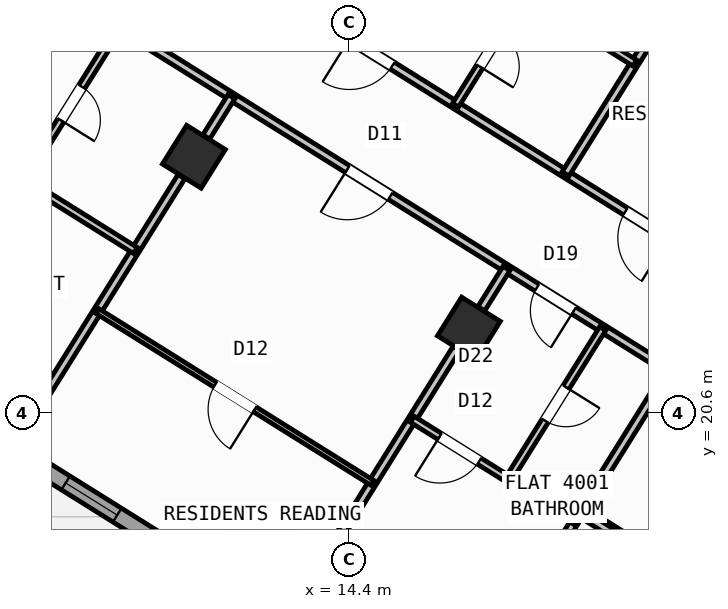
"""IFC4 building model, lengths in metres.
Left out: names, types, materials, properties, quantities, classifications, styles, units other than length and angle.
Written with IfcOpenShell. Run it as: python <this file> out.ifc"""

import sys

from ifc_helpers import new_model, si_unit, direction, frame, frame_2d, origin, origin_2d, place, context, subcontext, project, spatial, rectangle, hollow_rectangle, extrude, source, transform, mapped, element, fill, save


model = new_model("IFC4")
c1 = context("Model", 3, precision=1e-05, world=origin(), true_north=direction((0.0, 1.0)))
c2 = subcontext(c1, "Body", "Model", "MODEL_VIEW")
j1 = project(units=[si_unit("LENGTHUNIT", "METRE"), si_unit("PLANEANGLEUNIT", "RADIAN")], contexts=[c1])
p1 = place(None, origin())
s1 = spatial("IfcSite", under=j1, at=p1, CompositionType="ELEMENT")
p2 = place(p1, origin())
s2 = spatial("IfcBuilding", under=s1, at=p2, CompositionType="ELEMENT")
p3 = place(p2, frame((0.0, 0.0, 158.7)))
s3 = spatial("IfcBuildingStorey", under=s2, at=p3, CompositionType="ELEMENT", Elevation=158.7)
m1 = source(origin(), c2, "Body", "SweptSolid", [
    extrude(hollow_rectangle(XDim=0.9, YDim=0.9, WallThickness=0.036, at=origin_2d()), origin(), (0.0, 0.0, 1.0), 3.6),
])
for number, where, z_axis, x_axis in (
    (1, (16.764, 22.261, 0.0), (0.0, 0.0, 1.0), (-0.848, 0.53, 0.0)),
    (2, (11.336, 25.653, 0.0), (0.0, 0.0, 1.0), (-0.848, 0.53, 0.0)),
):
    element("IfcColumn", number, at=place(p3, frame(where, z_axis=z_axis, x_axis=x_axis)), inside=s3, PredefinedType="COLUMN", context=c2, shape_type="MappedRepresentation", body=[
        mapped(m1, transform((0.0, 0.0, 0.0), scale=1.0)),
    ])
p4 = place(p3, frame((29.268, 6.429, 0.0), z_axis=(0.0, 0.0, 1.0), x_axis=(-0.848049971435, 0.529916263149, 0.0)))
e3 = element("IfcWall", 3, at=p4, inside=s3, PredefinedType="STANDARD", context=c2, shape_type="SweptSolid", body=[
    extrude(rectangle(XDim=31.588, YDim=0.32, at=frame_2d((15.794, 0.0))), origin(), (0.0, 0.0, 1.0), 3.35),
])
p5 = place(p4, frame((16.362, 0.0, 0.0)))
e4 = element("IfcOpeningElement", 4, at=p5, cuts=e3, PredefinedType="OPENING", context=c2, shape_type="SweptSolid", body=[
    extrude(rectangle(XDim=1.2, YDim=2.15, at=frame_2d((0.6, 1.075))), frame((0.0, 0.17, 0.0), z_axis=(0.0, -1.0, 0.0), x_axis=(1.0, 0.0, 0.0)), (0.0, 0.0, 1.0), 0.34),
])
p6 = place(p4, frame((2.989, 0.0, 0.8)))
e5 = element("IfcOpeningElement", 5, at=p6, cuts=e3, PredefinedType="OPENING", context=c2, shape_type="SweptSolid", body=[
    extrude(rectangle(XDim=2.1, YDim=1.55, at=frame_2d((1.05, 0.775))), frame((0.0, 0.17, 0.0), z_axis=(0.0, -1.0, 0.0), x_axis=(1.0, 0.0, 0.0)), (0.0, 0.0, 1.0), 0.34),
])
p7 = place(p4, frame((8.359, 0.0, 0.8)))
e6 = element("IfcOpeningElement", 6, at=p7, cuts=e3, PredefinedType="OPENING", context=c2, shape_type="SweptSolid", body=[
    extrude(rectangle(XDim=2.1, YDim=1.55, at=frame_2d((1.05, 0.775))), frame((0.0, 0.17, 0.0), z_axis=(0.0, -1.0, 0.0), x_axis=(1.0, 0.0, 0.0)), (0.0, 0.0, 1.0), 0.34),
])
p8 = place(p4, frame((13.284, 0.0, 0.95)))
e7 = element("IfcOpeningElement", 7, at=p8, cuts=e3, PredefinedType="OPENING", context=c2, shape_type="SweptSolid", body=[
    extrude(rectangle(XDim=1.2, YDim=1.4, at=frame_2d((0.6, 0.7))), frame((0.0, 0.17, 0.0), z_axis=(0.0, -1.0, 0.0), x_axis=(1.0, 0.0, 0.0)), (0.0, 0.0, 1.0), 0.34),
])
p9 = place(p4, frame((20.259, 0.0, 0.95)))
e8 = element("IfcOpeningElement", 8, at=p9, cuts=e3, PredefinedType="OPENING", context=c2, shape_type="SweptSolid", body=[
    extrude(rectangle(XDim=1.2, YDim=1.4, at=frame_2d((0.6, 0.7))), frame((0.0, 0.17, 0.0), z_axis=(0.0, -1.0, 0.0), x_axis=(1.0, 0.0, 0.0)), (0.0, 0.0, 1.0), 0.34),
])
p10 = place(p4, frame((22.929, 0.0, 0.95)))
e9 = element("IfcOpeningElement", 9, at=p10, cuts=e3, PredefinedType="OPENING", context=c2, shape_type="SweptSolid", body=[
    extrude(rectangle(XDim=1.2, YDim=1.4, at=frame_2d((0.6, 0.7))), frame((0.0, 0.17, 0.0), z_axis=(0.0, -1.0, 0.0), x_axis=(1.0, 0.0, 0.0)), (0.0, 0.0, 1.0), 0.34),
])
p11 = place(p4, frame((27.481, 0.0, 0.8)))
e10 = element("IfcOpeningElement", 10, at=p11, cuts=e3, PredefinedType="OPENING", context=c2, shape_type="SweptSolid", body=[
    extrude(rectangle(XDim=2.1, YDim=1.55, at=frame_2d((1.05, 0.775))), frame((0.0, 0.17, 0.0), z_axis=(0.0, -1.0, 0.0), x_axis=(1.0, 0.0, 0.0)), (0.0, 0.0, 1.0), 0.34),
])
p12 = place(p3, frame((2.415, 23.452, 0.0), z_axis=(0.0, 0.0, 1.0), x_axis=(0.52991049553, 0.848053575387, 0.0)))
e11 = element("IfcWall", 11, at=p12, inside=s3, PredefinedType="STANDARD", context=c2, shape_type="SweptSolid", body=[
    extrude(rectangle(XDim=21.587, YDim=0.32, at=frame_2d((10.794, 0.0))), origin(), (0.0, 0.0, 1.0), 2.775),
])
p13 = place(p12, frame((1.406, 0.0, 0.8)))
e12 = element("IfcOpeningElement", 12, at=p13, cuts=e11, PredefinedType="OPENING", context=c2, shape_type="SweptSolid", body=[
    extrude(rectangle(XDim=2.1, YDim=1.55, at=frame_2d((1.05, 0.775))), frame((0.0, 0.17, 0.0), z_axis=(0.0, -1.0, 0.0), x_axis=(1.0, 0.0, 0.0)), (0.0, 0.0, 1.0), 0.34),
])
p14 = place(p12, frame((10.949, 0.0, 1.0)))
e13 = element("IfcOpeningElement", 13, at=p14, cuts=e11, PredefinedType="OPENING", context=c2, shape_type="SweptSolid", body=[
    extrude(rectangle(XDim=0.9, YDim=1.25, at=frame_2d((0.45, 0.625))), frame((0.0, 0.17, 0.0), z_axis=(0.0, -1.0, 0.0), x_axis=(1.0, 0.0, 0.0)), (0.0, 0.0, 1.0), 0.34),
])
p15 = place(p12, frame((15.369, 0.0, 0.85)))
e14 = element("IfcOpeningElement", 14, at=p15, cuts=e11, PredefinedType="OPENING", context=c2, shape_type="SweptSolid", body=[
    extrude(rectangle(XDim=1.5, YDim=1.5, at=frame_2d((0.75, 0.75))), frame((0.0, 0.17, 0.0), z_axis=(0.0, -1.0, 0.0), x_axis=(1.0, 0.0, 0.0)), (0.0, 0.0, 1.0), 0.34),
])
p16 = place(p12, frame((18.219, 0.0, 0.85)))
e15 = element("IfcOpeningElement", 15, at=p16, cuts=e11, PredefinedType="OPENING", context=c2, shape_type="SweptSolid", body=[
    extrude(rectangle(XDim=1.5, YDim=1.5, at=frame_2d((0.75, 0.75))), frame((0.0, 0.17, 0.0), z_axis=(0.0, -1.0, 0.0), x_axis=(1.0, 0.0, 0.0)), (0.0, 0.0, 1.0), 0.34),
])
p17 = place(p3, frame((14.138, 41.825, 0.0), z_axis=(0.0, 0.0, 1.0), x_axis=(0.848046498049, -0.529921821731, 0.0)))
e16 = element("IfcWall", 16, at=p17, inside=s3, PredefinedType="STANDARD", context=c2, shape_type="SweptSolid", body=[
    extrude(rectangle(XDim=31.588, YDim=0.32, at=frame_2d((15.794, 0.0))), origin(), (0.0, 0.0, 1.0), 3.35),
])
p18 = place(p17, frame((9.792, 0.0, 0.0)))
e17 = element("IfcOpeningElement", 17, at=p18, cuts=e16, PredefinedType="OPENING", context=c2, shape_type="SweptSolid", body=[
    extrude(rectangle(XDim=1.05, YDim=2.15, at=frame_2d((0.525, 1.075))), frame((0.0, 0.17, 0.0), z_axis=(0.0, -1.0, 0.0), x_axis=(1.0, 0.0, 0.0)), (0.0, 0.0, 1.0), 0.34),
])
p19 = place(p17, frame((0.791, 0.0, 0.85)))
e18 = element("IfcOpeningElement", 18, at=p19, cuts=e16, PredefinedType="OPENING", context=c2, shape_type="SweptSolid", body=[
    extrude(rectangle(XDim=1.8, YDim=1.5, at=frame_2d((0.9, 0.75))), frame((0.0, 0.17, 0.0), z_axis=(0.0, -1.0, 0.0), x_axis=(1.0, 0.0, 0.0)), (0.0, 0.0, 1.0), 0.34),
])
p20 = place(p17, frame((3.996, 0.0, 0.95)))
e19 = element("IfcOpeningElement", 19, at=p20, cuts=e16, PredefinedType="OPENING", context=c2, shape_type="SweptSolid", body=[
    extrude(rectangle(XDim=1.2, YDim=1.4, at=frame_2d((0.6, 0.7))), frame((0.0, 0.17, 0.0), z_axis=(0.0, -1.0, 0.0), x_axis=(1.0, 0.0, 0.0)), (0.0, 0.0, 1.0), 0.34),
])
p21 = place(p17, frame((13.874, 0.0, 0.85)))
e20 = element("IfcOpeningElement", 20, at=p21, cuts=e16, PredefinedType="OPENING", context=c2, shape_type="SweptSolid", body=[
    extrude(rectangle(XDim=1.5, YDim=1.5, at=frame_2d((0.75, 0.75))), frame((0.0, 0.17, 0.0), z_axis=(0.0, -1.0, 0.0), x_axis=(1.0, 0.0, 0.0)), (0.0, 0.0, 1.0), 0.34),
])
p22 = place(p17, frame((17.104, 0.0, 1.0)))
e21 = element("IfcOpeningElement", 21, at=p22, cuts=e16, PredefinedType="OPENING", context=c2, shape_type="SweptSolid", body=[
    extrude(rectangle(XDim=0.9, YDim=1.25, at=frame_2d((0.45, 0.625))), frame((0.0, 0.17, 0.0), z_axis=(0.0, -1.0, 0.0), x_axis=(1.0, 0.0, 0.0)), (0.0, 0.0, 1.0), 0.34),
])
p23 = place(p17, frame((22.144, 0.0, 1.0)))
e22 = element("IfcOpeningElement", 22, at=p23, cuts=e16, PredefinedType="OPENING", context=c2, shape_type="SweptSolid", body=[
    extrude(rectangle(XDim=0.9, YDim=1.25, at=frame_2d((0.45, 0.625))), frame((0.0, 0.17, 0.0), z_axis=(0.0, -1.0, 0.0), x_axis=(1.0, 0.0, 0.0)), (0.0, 0.0, 1.0), 0.34),
])
p24 = place(p17, frame((27.744, 0.0, 1.0)))
e23 = element("IfcOpeningElement", 23, at=p24, cuts=e16, PredefinedType="OPENING", context=c2, shape_type="SweptSolid", body=[
    extrude(rectangle(XDim=0.9, YDim=1.25, at=frame_2d((0.45, 0.625))), frame((0.0, 0.17, 0.0), z_axis=(0.0, -1.0, 0.0), x_axis=(1.0, 0.0, 0.0)), (0.0, 0.0, 1.0), 0.34),
])
p25 = place(p3, frame((21.206, 17.292, 0.0), z_axis=(0.0, 0.0, 1.0), x_axis=(-0.848050851465, 0.529914854792, 0.0)))
e24 = element("IfcWall", 24, at=p25, inside=s3, PredefinedType="PARTITIONING", context=c2, shape_type="SweptSolid", body=[
    extrude(rectangle(XDim=2.61, YDim=0.16, at=frame_2d((1.305, 0.0))), origin(), (0.0, 0.0, 1.0), 3.34),
])
p26 = place(p3, frame((20.719, 21.44, 0.0), z_axis=(0.0, 0.0, 1.0), x_axis=(-0.529906246318, -0.848056230514, 0.0)))
e25 = element("IfcWall", 25, at=p26, inside=s3, PredefinedType="PARTITIONING", context=c2, shape_type="SweptSolid", body=[
    extrude(rectangle(XDim=8.05, YDim=0.16, at=frame_2d((4.025, 0.0))), origin(), (0.0, 0.0, 1.0), 3.34),
])
p27 = place(p3, frame((21.885, 23.306, 0.0), z_axis=(0.0, 0.0, 1.0), x_axis=(-0.848052408131, 0.529912363569, 0.0)))
e26 = element("IfcWall", 26, at=p27, inside=s3, PredefinedType="PARTITIONING", context=c2, shape_type="SweptSolid", body=[
    extrude(rectangle(XDim=16.73, YDim=0.16, at=frame_2d((8.365, 0.0))), origin(), (0.0, 0.0, 1.0), 3.34),
])
p28 = place(p27, frame((1.395, 0.0, 0.0)))
e27 = element("IfcOpeningElement", 27, at=p28, cuts=e26, PredefinedType="OPENING", context=c2, shape_type="SweptSolid", body=[
    extrude(rectangle(XDim=1.0, YDim=2.1, at=frame_2d((0.5, 1.05))), frame((0.0, 0.09, 0.0), z_axis=(0.0, -1.0, 0.0), x_axis=(1.0, 0.0, 0.0)), (0.0, 0.0, 1.0), 0.18),
])
p29 = place(p27, frame((7.82, 0.0, 0.0)))
e28 = element("IfcOpeningElement", 28, at=p29, cuts=e26, PredefinedType="OPENING", context=c2, shape_type="SweptSolid", body=[
    extrude(rectangle(XDim=1.0, YDim=2.1, at=frame_2d((0.5, 1.05))), frame((0.0, 0.09, 0.0), z_axis=(0.0, -1.0, 0.0), x_axis=(1.0, 0.0, 0.0)), (0.0, 0.0, 1.0), 0.18),
])
p30 = place(p27, frame((11.14, 0.0, 0.0)))
e29 = element("IfcOpeningElement", 29, at=p30, cuts=e26, PredefinedType="OPENING", context=c2, shape_type="SweptSolid", body=[
    extrude(rectangle(XDim=1.0, YDim=2.1, at=frame_2d((0.5, 1.05))), frame((0.0, 0.09, 0.0), z_axis=(0.0, -1.0, 0.0), x_axis=(1.0, 0.0, 0.0)), (0.0, 0.0, 1.0), 0.18),
])
p31 = place(p3, frame((20.719, 21.44, 0.0), z_axis=(0.0, 0.0, 1.0), x_axis=(-0.848048310262, 0.529918921593, 0.0)))
e30 = element("IfcWall", 30, at=p31, inside=s3, PredefinedType="PARTITIONING", context=c2, shape_type="SweptSolid", body=[
    extrude(rectangle(XDim=16.73, YDim=0.16, at=frame_2d((8.365, 0.0))), origin(), (0.0, 0.0, 1.0), 3.34),
])
p32 = place(p31, frame((2.22, 0.0, 0.0)))
e31 = element("IfcOpeningElement", 31, at=p32, cuts=e30, PredefinedType="OPENING", context=c2, shape_type="SweptSolid", body=[
    extrude(rectangle(XDim=0.86, YDim=2.05, at=frame_2d((0.43, 1.025))), frame((0.0, 0.09, 0.0), z_axis=(0.0, -1.0, 0.0), x_axis=(1.0, 0.0, 0.0)), (0.0, 0.0, 1.0), 0.18),
])
p33 = place(p31, frame((6.49, 0.0, 0.0)))
e32 = element("IfcOpeningElement", 32, at=p33, cuts=e30, PredefinedType="OPENING", context=c2, shape_type="SweptSolid", body=[
    extrude(rectangle(XDim=1.0, YDim=2.1, at=frame_2d((0.5, 1.05))), frame((0.0, 0.09, 0.0), z_axis=(0.0, -1.0, 0.0), x_axis=(1.0, 0.0, 0.0)), (0.0, 0.0, 1.0), 0.18),
])
p34 = place(p31, frame((14.304, 0.0, 0.0)))
e33 = element("IfcOpeningElement", 33, at=p34, cuts=e30, PredefinedType="OPENING", context=c2, shape_type="SweptSolid", body=[
    extrude(rectangle(XDim=1.0, YDim=2.1, at=frame_2d((0.5, 1.05))), frame((0.0, 0.09, 0.0), z_axis=(0.0, -1.0, 0.0), x_axis=(1.0, 0.0, 0.0)), (0.0, 0.0, 1.0), 0.18),
])
p35 = place(p3, frame((17.506, 23.449, 0.0), z_axis=(0.0, 0.0, 1.0), x_axis=(-0.529835187763, -0.848100627171, 0.0)))
e34 = element("IfcWall", 34, at=p35, inside=s3, PredefinedType="PARTITIONING", context=c2, shape_type="SweptSolid", body=[
    extrude(rectangle(XDim=0.938, YDim=0.16, at=frame_2d((0.469, 0.0))), origin(), (0.0, 0.0, 1.0), 2.775),
])
p36 = place(p3, frame((16.519, 21.87, 0.0), z_axis=(0.0, 0.0, 1.0), x_axis=(-0.529922447305, -0.848046107144, 0.0)))
e35 = element("IfcWall", 35, at=p36, inside=s3, PredefinedType="PARTITIONING", context=c2, shape_type="SweptSolid", body=[
    extrude(rectangle(XDim=5.451, YDim=0.16, at=frame_2d((2.726, 0.0))), origin(), (0.0, 0.0, 1.0), 2.775),
])
p37 = place(p3, frame((18.86, 18.464, 0.0), z_axis=(0.0, 0.0, 1.0), x_axis=(-0.848059820872, 0.529900500304, 0.0)))
e36 = element("IfcWall", 36, at=p37, inside=s3, PredefinedType="PLUMBINGWALL", context=c2, shape_type="SweptSolid", body=[
    extrude(rectangle(XDim=3.79, YDim=0.14, at=frame_2d((1.895, 0.0))), origin(), (0.0, 0.0, 1.0), 3.34),
])
p38 = place(p37, frame((2.23, 0.0, 0.0)))
e37 = element("IfcOpeningElement", 37, at=p38, cuts=e36, PredefinedType="OPENING", context=c2, shape_type="SweptSolid", body=[
    extrude(rectangle(XDim=0.92, YDim=2.08, at=frame_2d((0.46, 1.04))), frame((0.0, 0.08, 0.0), z_axis=(0.0, -1.0, 0.0), x_axis=(1.0, 0.0, 0.0)), (0.0, 0.0, 1.0), 0.16),
])
p39 = place(p3, frame((19.405, 22.261, 0.0), z_axis=(0.0, 0.0, 1.0), x_axis=(-0.529898896701, -0.848060822863, 0.0)))
e38 = element("IfcWall", 38, at=p39, inside=s3, PredefinedType="PLUMBINGWALL", context=c2, shape_type="SweptSolid", body=[
    extrude(rectangle(XDim=3.51, YDim=0.14, at=frame_2d((1.755, 0.0))), origin(), (0.0, 0.0, 1.0), 2.995),
])
p40 = place(p39, frame((1.365, 0.0, 0.0)))
e39 = element("IfcOpeningElement", 39, at=p40, cuts=e38, PredefinedType="OPENING", context=c2, shape_type="SweptSolid", body=[
    extrude(rectangle(XDim=0.78, YDim=2.05, at=frame_2d((0.39, 1.025))), frame((0.0, 0.08, 0.0), z_axis=(0.0, -1.0, 0.0), x_axis=(1.0, 0.0, 0.0)), (0.0, 0.0, 1.0), 0.16),
])
p41 = place(p3, frame((12.078, 26.84, 0.0), z_axis=(0.0, 0.0, 1.0), x_axis=(-0.529952145338, -0.848027548876, 0.0)))
e40 = element("IfcWall", 40, at=p41, inside=s3, PredefinedType="PARTITIONING", context=c2, shape_type="SweptSolid", body=[
    extrude(rectangle(XDim=0.938, YDim=0.16, at=frame_2d((0.469, 0.0))), origin(), (0.0, 0.0, 1.0), 2.775),
])
p42 = place(p3, frame((11.091, 25.261, 0.0), z_axis=(0.0, 0.0, 1.0), x_axis=(-0.52994257524, -0.848033529377, 0.0)))
e41 = element("IfcWall", 41, at=p42, inside=s3, PredefinedType="PARTITIONING", context=c2, shape_type="SweptSolid", body=[
    extrude(rectangle(XDim=5.451, YDim=0.16, at=frame_2d((2.726, 0.0))), origin(), (0.0, 0.0, 1.0), 2.775),
])
p43 = place(p3, frame((14.86, 19.215, 0.0), z_axis=(0.0, 0.0, 1.0), x_axis=(-0.848039019877, 0.529933789039, 0.0)))
e42 = element("IfcWall", 42, at=p43, inside=s3, PredefinedType="PARTITIONING", context=c2, shape_type="SweptSolid", body=[
    extrude(rectangle(XDim=6.4, YDim=0.11, at=frame_2d((3.2, 0.0))), origin(), (0.0, 0.0, 1.0), 3.34),
])
p44 = place(p43, frame((2.74, 0.0, 0.0)))
e43 = element("IfcOpeningElement", 43, at=p44, cuts=e42, PredefinedType="OPENING", context=c2, shape_type="SweptSolid", body=[
    extrude(rectangle(XDim=0.92, YDim=2.08, at=frame_2d((0.46, 1.04))), frame((0.0, 0.065, 0.0), z_axis=(0.0, -1.0, 0.0), x_axis=(1.0, 0.0, 0.0)), (0.0, 0.0, 1.0), 0.13),
])
p45 = place(p3, frame((10.181, 23.804, 0.0), z_axis=(0.0, 0.0, 1.0), x_axis=(-0.848065614912, 0.529891227332, 0.0)))
e44 = element("IfcWall", 44, at=p45, inside=s3, PredefinedType="PLUMBINGWALL", context=c2, shape_type="SweptSolid", body=[
    extrude(rectangle(XDim=6.52, YDim=0.14, at=frame_2d((3.26, 0.0))), origin(), (0.0, 0.0, 1.0), 3.34),
])
p46 = place(p45, frame((4.124, 0.0, 0.0)))
e45 = element("IfcOpeningElement", 45, at=p46, cuts=e44, PredefinedType="OPENING", context=c2, shape_type="SweptSolid", body=[
    extrude(rectangle(XDim=0.92, YDim=2.08, at=frame_2d((0.46, 1.04))), frame((0.0, 0.08, 0.0), z_axis=(0.0, -1.0, 0.0), x_axis=(1.0, 0.0, 0.0)), (0.0, 0.0, 1.0), 0.16),
])
p47 = place(p3, frame((9.866, 28.222, 0.0), z_axis=(0.0, 0.0, 1.0), x_axis=(-0.529876336437, -0.84807491891, 0.0)))
e46 = element("IfcWall", 46, at=p47, inside=s3, PredefinedType="PLUMBINGWALL", context=c2, shape_type="SweptSolid", body=[
    extrude(rectangle(XDim=3.58, YDim=0.14, at=frame_2d((1.79, 0.0))), origin(), (0.0, 0.0, 1.0), 3.34),
])
p48 = place(p47, frame((1.4, 0.0, 0.0)))
e47 = element("IfcOpeningElement", 47, at=p48, cuts=e46, PredefinedType="OPENING", context=c2, shape_type="SweptSolid", body=[
    extrude(rectangle(XDim=0.78, YDim=2.05, at=frame_2d((0.39, 1.025))), frame((0.0, 0.08, 0.0), z_axis=(0.0, -1.0, 0.0), x_axis=(1.0, 0.0, 0.0)), (0.0, 0.0, 1.0), 0.16),
])
p49 = place(p3, frame((20.387, 28.06, 0.0), z_axis=(0.0, 0.0, 1.0), x_axis=(-0.529890499457, -0.848066069705, 0.0)))
e48 = element("IfcWall", 48, at=p49, inside=s3, PredefinedType="PARTITIONING", context=c2, shape_type="SweptSolid", body=[
    extrude(rectangle(XDim=3.238, YDim=0.16, at=frame_2d((1.619, 0.0))), origin(), (0.0, 0.0, 1.0), 2.775),
])
p50 = place(p3, frame((20.039, 27.502, 0.0), z_axis=(0.0, 0.0, 1.0), x_axis=(-0.848039019877, 0.529933789039, 0.0)))
e49 = element("IfcWall", 49, at=p50, inside=s3, PredefinedType="PLUMBINGWALL", context=c2, shape_type="SweptSolid", body=[
    extrude(rectangle(XDim=6.4, YDim=0.14, at=frame_2d((3.2, 0.0))), origin(), (0.0, 0.0, 1.0), 3.34),
])
p51 = place(p50, frame((2.824, 0.0, 0.0)))
e50 = element("IfcOpeningElement", 50, at=p51, cuts=e49, PredefinedType="OPENING", context=c2, shape_type="SweptSolid", body=[
    extrude(rectangle(XDim=0.78, YDim=2.05, at=frame_2d((0.39, 1.025))), frame((0.0, 0.08, 0.0), z_axis=(0.0, -1.0, 0.0), x_axis=(1.0, 0.0, 0.0)), (0.0, 0.0, 1.0), 0.16),
])
p52 = place(p3, frame((17.867, 28.859, 0.0), z_axis=(0.0, 0.0, 1.0), x_axis=(-0.529913878929, -0.848051461244, 0.0)))
e51 = element("IfcWall", 51, at=p52, inside=s3, PredefinedType="PLUMBINGWALL", context=c2, shape_type="SweptSolid", body=[
    extrude(rectangle(XDim=2.58, YDim=0.14, at=frame_2d((1.29, 0.0))), origin(), (0.0, 0.0, 1.0), 3.34),
])
p53 = place(p52, frame((0.9, 0.0, 0.0)))
e52 = element("IfcOpeningElement", 52, at=p53, cuts=e51, PredefinedType="OPENING", context=c2, shape_type="SweptSolid", body=[
    extrude(rectangle(XDim=0.78, YDim=2.05, at=frame_2d((0.39, 1.025))), frame((0.0, 0.08, 0.0), z_axis=(0.0, -1.0, 0.0), x_axis=(1.0, 0.0, 0.0)), (0.0, 0.0, 1.0), 0.16),
])
p54 = place(p3, frame((32.164, 10.374, 0.0), z_axis=(0.0, 0.0, 1.0), x_axis=(-0.848044107957, 0.529925646633, 0.0)))
e53 = element("IfcWall", 53, at=p54, inside=s3, PredefinedType="PARTITIONING", context=c2, shape_type="SweptSolid", body=[
    extrude(rectangle(XDim=15.57, YDim=0.16, at=frame_2d((7.785, 0.0))), origin(), (0.0, 0.0, 1.0), 3.34),
])
p55 = place(p54, frame((10.83, 0.0, 0.0)))
e54 = element("IfcOpeningElement", 54, at=p55, cuts=e53, PredefinedType="OPENING", context=c2, shape_type="SweptSolid", body=[
    extrude(rectangle(XDim=1.0, YDim=2.1, at=frame_2d((0.5, 1.05))), frame((0.0, 0.09, 0.0), z_axis=(0.0, -1.0, 0.0), x_axis=(1.0, 0.0, 0.0)), (0.0, 0.0, 1.0), 0.18),
])
m2 = source(origin(), c2, "Body", "SweptSolid", [
    extrude(rectangle(XDim=1.2, YDim=1.4, at=frame_2d((0.6, 0.7))), frame((0.0, 0.03, 0.0), z_axis=(0.0, -1.0, 0.0), x_axis=(1.0, 0.0, 0.0)), (0.0, 0.0, 1.0), 0.06),
])
p56 = place(p10, origin())
e55 = element("IfcWindow", 55, at=p56, inside=s3, PartitioningType="SINGLE_PANEL", PredefinedType="WINDOW", context=c2, shape_type="MappedRepresentation", body=[
    mapped(m2, transform((0.0, 0.0, 0.0), scale=1.0)),
])
fill(e9, e55)
m3 = source(origin(), c2, "Body", "SweptSolid", [
    extrude(rectangle(XDim=0.86, YDim=2.05, at=frame_2d((0.43, 1.025))), frame((0.0, 0.025, 0.0), z_axis=(0.0, -1.0, 0.0), x_axis=(1.0, 0.0, 0.0)), (0.0, 0.0, 1.0), 0.05),
])
p57 = place(p32, origin())
e56 = element("IfcDoor", 56, at=p57, inside=s3, OperationType="SINGLE_SWING_LEFT", PredefinedType="DOOR", context=c2, shape_type="MappedRepresentation", body=[
    mapped(m3, transform((0.0, 0.0, 0.0), scale=1.0)),
])
fill(e31, e56)
m4 = source(origin(), c2, "Body", "SweptSolid", [
    extrude(rectangle(XDim=0.92, YDim=2.08, at=frame_2d((0.46, 1.04))), frame((0.0, 0.025, 0.0), z_axis=(0.0, -1.0, 0.0), x_axis=(1.0, 0.0, 0.0)), (0.0, 0.0, 1.0), 0.05),
])
p58 = place(p38, origin())
e57 = element("IfcDoor", 57, at=p58, inside=s3, OperationType="SINGLE_SWING_RIGHT", PredefinedType="DOOR", context=c2, shape_type="MappedRepresentation", body=[
    mapped(m4, transform((0.0, 0.0, 0.0), scale=1.0)),
])
fill(e37, e57)
m5 = source(origin(), c2, "Body", "SweptSolid", [
    extrude(rectangle(XDim=0.78, YDim=2.05, at=frame_2d((0.39, 1.025))), frame((0.0, 0.025, 0.0), z_axis=(0.0, -1.0, 0.0), x_axis=(1.0, 0.0, 0.0)), (0.0, 0.0, 1.0), 0.05),
])
p59 = place(p40, origin())
e58 = element("IfcDoor", 58, at=p59, inside=s3, OperationType="SINGLE_SWING_LEFT", PredefinedType="DOOR", context=c2, shape_type="MappedRepresentation", body=[
    mapped(m5, transform((0.0, 0.0, 0.0), scale=1.0)),
])
fill(e39, e58)
m6 = source(origin(), c2, "Body", "SweptSolid", [
    extrude(rectangle(XDim=1.0, YDim=2.1, at=frame_2d((0.5, 1.05))), frame((0.0, 0.025, 0.0), z_axis=(0.0, -1.0, 0.0), x_axis=(1.0, 0.0, 0.0)), (0.0, 0.0, 1.0), 0.05),
])
p60 = place(p33, origin())
e59 = element("IfcDoor", 59, at=p60, inside=s3, OperationType="SINGLE_SWING_RIGHT", PredefinedType="DOOR", context=c2, shape_type="MappedRepresentation", body=[
    mapped(m6, transform((0.0, 0.0, 0.0), scale=1.0)),
])
fill(e32, e59)
p61 = place(p44, origin())
e60 = element("IfcDoor", 60, at=p61, inside=s3, OperationType="SINGLE_SWING_LEFT", PredefinedType="DOOR", context=c2, shape_type="MappedRepresentation", body=[
    mapped(m4, transform((0.0, 0.0, 0.0), scale=1.0)),
])
fill(e43, e60)
p62 = place(p48, origin())
e61 = element("IfcDoor", 61, at=p62, inside=s3, OperationType="SINGLE_SWING_RIGHT", PredefinedType="DOOR", context=c2, shape_type="MappedRepresentation", body=[
    mapped(m5, transform((0.0, 0.0, 0.0), scale=1.0)),
])
fill(e47, e61)
p63 = place(p28, origin())
e62 = element("IfcDoor", 62, at=p63, inside=s3, OperationType="SINGLE_SWING_LEFT", PredefinedType="DOOR", context=c2, shape_type="MappedRepresentation", body=[
    mapped(m6, transform((0.0, 0.0, 0.0), scale=1.0)),
])
fill(e27, e62)
p64 = place(p29, origin())
e63 = element("IfcDoor", 63, at=p64, inside=s3, OperationType="SINGLE_SWING_RIGHT", PredefinedType="DOOR", context=c2, shape_type="MappedRepresentation", body=[
    mapped(m6, transform((0.0, 0.0, 0.0), scale=1.0)),
])
fill(e28, e63)
p65 = place(p53, origin())
e64 = element("IfcDoor", 64, at=p65, inside=s3, OperationType="SINGLE_SWING_RIGHT", PredefinedType="DOOR", context=c2, shape_type="MappedRepresentation", body=[
    mapped(m5, transform((0.0, 0.0, 0.0), scale=1.0)),
])
fill(e52, e64)
save(model, sys.argv[1])
